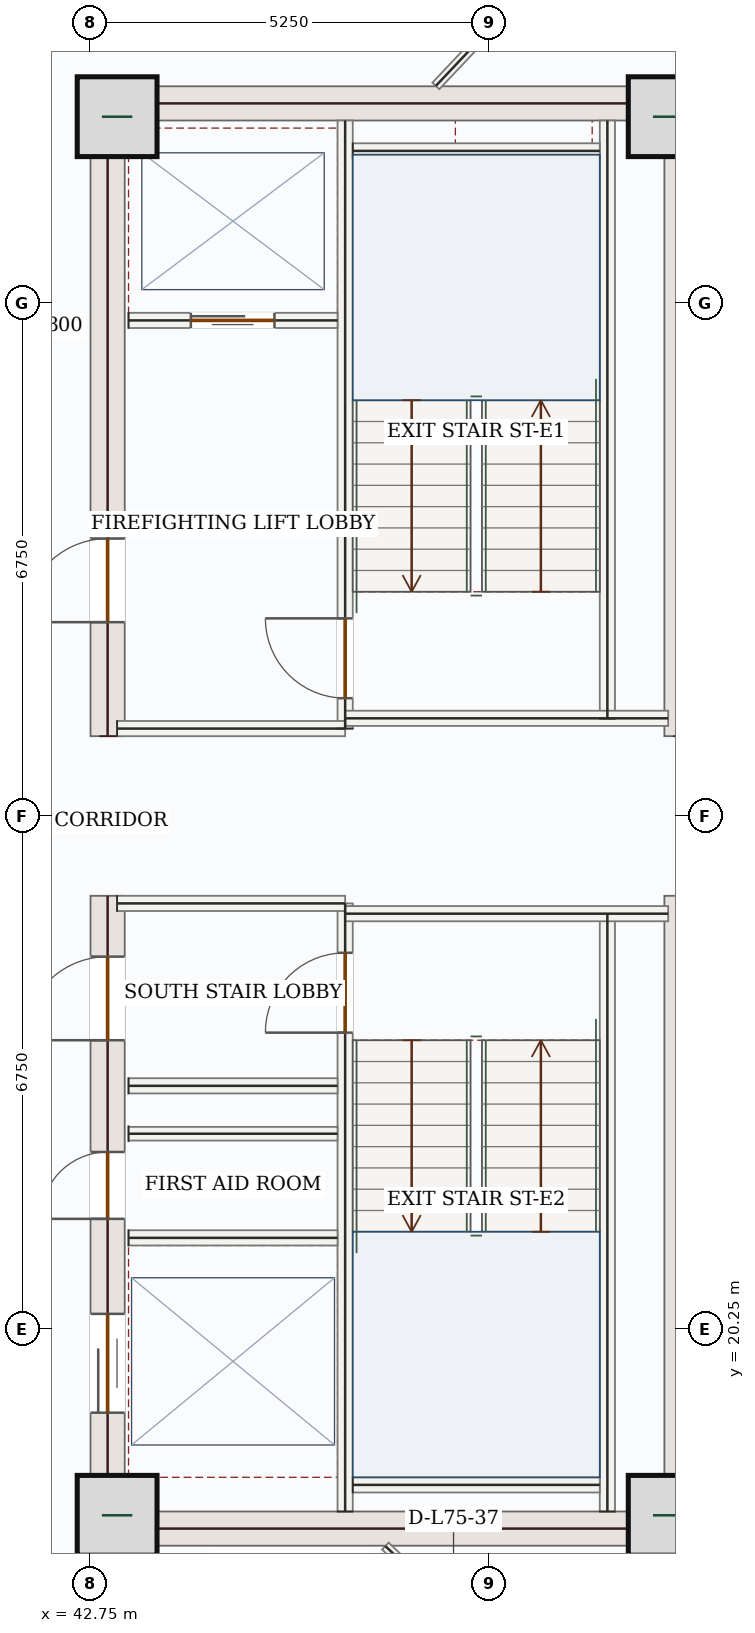
"""IFC4 building model, lengths in metres.
Left out: names, types, materials, properties, quantities, classifications, styles, units other than length and angle.
Written with IfcOpenShell. Run it as: python <this file> out.ifc"""

import sys

from ifc_helpers import new_model, si_unit, direction, frame, frame_2d, origin, origin_2d, place, context, subcontext, project, spatial, rectangle, extrude, source, transform, mapped, element, fill, save


model = new_model("IFC4")
c1 = context("Model", 3, precision=1e-05, world=origin(), true_north=direction((0.0, 1.0)))
c2 = subcontext(c1, "Body", "Model", "MODEL_VIEW")
j1 = project(units=[si_unit("LENGTHUNIT", "METRE"), si_unit("PLANEANGLEUNIT", "RADIAN")], contexts=[c1])
p1 = place(None, origin())
s1 = spatial("IfcSite", under=j1, at=p1, CompositionType="ELEMENT")
p2 = place(p1, origin())
s2 = spatial("IfcBuilding", under=s1, at=p2, CompositionType="ELEMENT")
p3 = place(p2, frame((0.0, 0.0, 310.35)))
s3 = spatial("IfcBuildingStorey", under=s2, at=p3, CompositionType="ELEMENT", Elevation=310.35)
p4 = place(p3, frame((42.975, 17.4, 0.0), z_axis=(0.0, 0.0, 1.0), x_axis=(0.0, 1.0, 0.0)))
e1 = element("IfcWall", 1, at=p4, inside=s3, PredefinedType="SHEAR", context=c2, shape_type="SweptSolid", body=[
    extrude(rectangle(XDim=8.55, YDim=0.45, at=frame_2d((4.275, 0.0))), origin(), (0.0, 0.0, 1.0), 3.3),
])
p5 = place(p4, frame((6.65, 0.0, 0.0)))
e2 = element("IfcOpeningElement", 2, at=p5, cuts=e1, PredefinedType="OPENING", context=c2, shape_type="SweptSolid", body=[
    extrude(rectangle(XDim=1.1, YDim=2.2, at=frame_2d((0.55, 1.1))), frame((0.0, 0.235, 0.0), z_axis=(0.0, -1.0, 0.0), x_axis=(1.0, 0.0, 0.0)), (0.0, 0.0, 1.0), 0.47),
])
p6 = place(p4, frame((1.75, 0.0, 0.0)))
e3 = element("IfcOpeningElement", 3, at=p6, cuts=e1, PredefinedType="OPENING", context=c2, shape_type="SweptSolid", body=[
    extrude(rectangle(XDim=1.3, YDim=2.2, at=frame_2d((0.65, 1.1))), frame((0.0, 0.235, 0.0), z_axis=(0.0, -1.0, 0.0), x_axis=(1.0, 0.0, 0.0)), (0.0, 0.0, 1.0), 0.47),
])
p7 = place(p4, frame((4.3, 0.0, 0.0)))
e4 = element("IfcOpeningElement", 4, at=p7, cuts=e1, PredefinedType="OPENING", context=c2, shape_type="SweptSolid", body=[
    extrude(rectangle(XDim=0.88, YDim=2.1, at=frame_2d((0.44, 1.05))), frame((0.0, 0.235, 0.0), z_axis=(0.0, -1.0, 0.0), x_axis=(1.0, 0.0, 0.0)), (0.0, 0.0, 1.0), 0.47),
])
p8 = place(p3, frame((42.975, 28.05, 0.0), z_axis=(0.0, 0.0, 1.0), x_axis=(0.0, 1.0, 0.0)))
e5 = element("IfcWall", 5, at=p8, inside=s3, PredefinedType="SHEAR", context=c2, shape_type="SweptSolid", body=[
    extrude(rectangle(XDim=8.55, YDim=0.45, at=frame_2d((4.275, 0.0))), origin(), (0.0, 0.0, 1.0), 3.3),
])
p9 = place(p8, frame((1.5, 0.0, 0.0)))
e6 = element("IfcOpeningElement", 6, at=p9, cuts=e5, PredefinedType="OPENING", context=c2, shape_type="SweptSolid", body=[
    extrude(rectangle(XDim=1.1, YDim=2.2, at=frame_2d((0.55, 1.1))), frame((0.0, 0.235, 0.0), z_axis=(0.0, -1.0, 0.0), x_axis=(1.0, 0.0, 0.0)), (0.0, 0.0, 1.0), 0.47),
])
m1 = source(origin(), c2, "Body", "SweptSolid", [
    extrude(rectangle(XDim=8.55, YDim=0.45, at=frame_2d((4.275, 0.0))), origin(), (0.0, 0.0, 1.0), 3.3),
])
for number, where, z_axis, x_axis in (
    (7, (50.525, 17.4, 0.0), (0.0, 0.0, 1.0), (0.0, 1.0, 0.0)),
    (8, (50.525, 28.05, 0.0), (0.0, 0.0, 1.0), (0.0, 1.0, 0.0)),
):
    element("IfcWall", number, at=place(p3, frame(where, z_axis=z_axis, x_axis=x_axis)), inside=s3, PredefinedType="SHEAR", context=c2, shape_type="MappedRepresentation", body=[
        mapped(m1, transform((0.0, 0.0, 0.0), x_axis=(1.0, 0.0, 0.0), y_axis=(0.0, 1.0, 0.0), z_axis=(0.0, 0.0, 1.0), scale=1.0)),
    ])
m2 = source(origin(), c2, "Body", "SweptSolid", [
    extrude(rectangle(XDim=7.1, YDim=0.45, at=frame_2d((3.55, 0.0))), origin(), (0.0, 0.0, 1.0), 3.3),
])
for number, where, z_axis, x_axis in (
    (9, (43.2, 17.625, 0.0), (0.0, 0.0, 1.0), (1.0, 0.0, 0.0)),
    (10, (43.2, 36.375, 0.0), (0.0, 0.0, 1.0), (1.0, 0.0, 0.0)),
):
    element("IfcWall", number, at=place(p3, frame(where, z_axis=z_axis, x_axis=x_axis)), inside=s3, PredefinedType="SHEAR", context=c2, shape_type="MappedRepresentation", body=[
        mapped(m2, transform((0.0, 0.0, 0.0), x_axis=(1.0, 0.0, 0.0), y_axis=(0.0, 1.0, 0.0), z_axis=(0.0, 0.0, 1.0), scale=1.0)),
    ])
m3 = source(origin(), c2, "Body", "SweptSolid", [
    extrude(rectangle(XDim=1.05, YDim=1.05, at=origin_2d()), origin(), (0.0, 0.0, 1.0), 3.75),
])
for number, where, z_axis, x_axis in (
    (11, (43.1, 17.8, 0.0), (0.0, 0.0, 1.0), (1.0, 0.0, 0.0)),
    (12, (50.35, 17.8, 0.0), (0.0, 0.0, 1.0), (1.0, 0.0, 0.0)),
    (13, (43.1, 36.2, 0.0), (0.0, 0.0, 1.0), (1.0, 0.0, 0.0)),
    (14, (50.35, 36.2, 0.0), (0.0, 0.0, 1.0), (1.0, 0.0, 0.0)),
):
    element("IfcColumn", number, at=place(p3, frame(where, z_axis=z_axis, x_axis=x_axis)), inside=s3, PredefinedType="COLUMN", context=c2, shape_type="MappedRepresentation", body=[
        mapped(m3, transform((0.0, 0.0, 0.0), x_axis=(1.0, 0.0, 0.0), y_axis=(0.0, 1.0, 0.0), z_axis=(0.0, 0.0, 1.0), scale=1.0)),
    ])
m4 = source(origin(), c2, "Body", "SweptSolid", [
    extrude(rectangle(XDim=9.92, YDim=0.28, at=frame_2d((4.96, 0.0))), origin(), (0.0, 0.0, 1.0), 3.3),
])
p10 = place(p3, frame((44.91, 43.649, 0.0), z_axis=(0.0, 0.0, 1.0), x_axis=(0.726772856404, -0.686877875022, 0.0)))
e15 = element("IfcWall", 15, at=p10, inside=s3, PredefinedType="SOLIDWALL", context=c2, shape_type="MappedRepresentation", body=[
    mapped(m4, transform((0.0, 0.0, 0.0), x_axis=(1.0, 0.0, 0.0), y_axis=(0.0, 1.0, 0.0), z_axis=(0.0, 0.0, 1.0), scale=1.0)),
])
m5 = source(origin(), c2, "Body", "SweptSolid", [
    extrude(rectangle(XDim=10.47, YDim=0.28, at=frame_2d((5.235, 0.0))), origin(), (0.0, 0.0, 1.0), 3.3),
])
p11 = place(p3, frame((53.06, 18.458, 0.0), z_axis=(0.0, 0.0, 1.0), x_axis=(-0.690070788875, -0.723741878256, 0.0)))
e16 = element("IfcWall", 16, at=p11, inside=s3, PredefinedType="SOLIDWALL", context=c2, shape_type="MappedRepresentation", body=[
    mapped(m5, transform((0.0, 0.0, 0.0), x_axis=(1.0, 0.0, 0.0), y_axis=(0.0, 1.0, 0.0), z_axis=(0.0, 0.0, 1.0), scale=1.0)),
])
m6 = source(origin(), c2, "Body", "SweptSolid", [
    extrude(rectangle(XDim=7.87, YDim=0.2, at=frame_2d((3.935, 0.0))), origin(), (0.0, 0.0, 1.0), 3.3),
])
for number, where, z_axis, x_axis in (
    (17, (49.55, 17.85, 0.0), (0.0, 0.0, 1.0), (0.0, 1.0, 0.0)),
    (18, (49.55, 28.28, 0.0), (0.0, 0.0, 1.0), (0.0, 1.0, 0.0)),
):
    element("IfcWall", number, at=place(p3, frame(where, z_axis=z_axis, x_axis=x_axis)), inside=s3, PredefinedType="SOLIDWALL", context=c2, shape_type="MappedRepresentation", body=[
        mapped(m6, transform((0.0, 0.0, 0.0), x_axis=(1.0, 0.0, 0.0), y_axis=(0.0, 1.0, 0.0), z_axis=(0.0, 0.0, 1.0), scale=1.0)),
    ])
p12 = place(p3, frame((46.1, 17.85, 0.0), z_axis=(0.0, 0.0, 1.0), x_axis=(0.0, 1.0, 0.0)))
e19 = element("IfcWall", 19, at=p12, inside=s3, PredefinedType="SOLIDWALL", context=c2, shape_type="SweptSolid", body=[
    extrude(rectangle(XDim=8.0, YDim=0.2, at=frame_2d((4.0, 0.0))), origin(), (0.0, 0.0, 1.0), 3.3),
])
p13 = place(p12, frame((6.3, 0.0, 0.0)))
e20 = element("IfcOpeningElement", 20, at=p13, cuts=e19, PredefinedType="OPENING", context=c2, shape_type="SweptSolid", body=[
    extrude(rectangle(XDim=1.05, YDim=2.15, at=frame_2d((0.525, 1.075))), frame((0.0, 0.11, 0.0), z_axis=(0.0, -1.0, 0.0), x_axis=(1.0, 0.0, 0.0)), (0.0, 0.0, 1.0), 0.22),
])
p14 = place(p3, frame((46.1, 28.15, 0.0), z_axis=(0.0, 0.0, 1.0), x_axis=(0.0, 1.0, 0.0)))
e21 = element("IfcWall", 21, at=p14, inside=s3, PredefinedType="SOLIDWALL", context=c2, shape_type="SweptSolid", body=[
    extrude(rectangle(XDim=8.0, YDim=0.2, at=frame_2d((4.0, 0.0))), origin(), (0.0, 0.0, 1.0), 3.3),
])
p15 = place(p14, frame((0.4, 0.0, 0.0)))
e22 = element("IfcOpeningElement", 22, at=p15, cuts=e21, PredefinedType="OPENING", context=c2, shape_type="SweptSolid", body=[
    extrude(rectangle(XDim=1.05, YDim=2.15, at=frame_2d((0.525, 1.075))), frame((0.0, 0.11, 0.0), z_axis=(0.0, -1.0, 0.0), x_axis=(1.0, 0.0, 0.0)), (0.0, 0.0, 1.0), 0.22),
])
m7 = source(origin(), c2, "Body", "SweptSolid", [
    extrude(rectangle(XDim=3.0, YDim=0.2, at=frame_2d((1.5, 0.0))), origin(), (0.0, 0.0, 1.0), 3.3),
])
p16 = place(p3, frame((43.1, 25.85, 0.0), z_axis=(0.0, 0.0, 1.0), x_axis=(1.0, 0.0, 0.0)))
e23 = element("IfcWall", 23, at=p16, inside=s3, PredefinedType="SOLIDWALL", context=c2, shape_type="MappedRepresentation", body=[
    mapped(m7, transform((0.0, 0.0, 0.0), x_axis=(1.0, 0.0, 0.0), y_axis=(0.0, 1.0, 0.0), z_axis=(0.0, 0.0, 1.0), scale=1.0)),
])
m8 = source(origin(), c2, "Body", "SweptSolid", [
    extrude(rectangle(XDim=4.25, YDim=0.2, at=frame_2d((2.125, 0.0))), origin(), (0.0, 0.0, 1.0), 3.3),
])
p17 = place(p3, frame((46.1, 25.715, 0.0), z_axis=(0.0, 0.0, 1.0), x_axis=(1.0, 0.0, 0.0)))
e24 = element("IfcWall", 24, at=p17, inside=s3, PredefinedType="SOLIDWALL", context=c2, shape_type="MappedRepresentation", body=[
    mapped(m8, transform((0.0, 0.0, 0.0), x_axis=(1.0, 0.0, 0.0), y_axis=(0.0, 1.0, 0.0), z_axis=(0.0, 0.0, 1.0), scale=1.0)),
])
p18 = place(p3, frame((43.1, 28.15, 0.0), z_axis=(0.0, 0.0, 1.0), x_axis=(1.0, 0.0, 0.0)))
e25 = element("IfcWall", 25, at=p18, inside=s3, PredefinedType="SOLIDWALL", context=c2, shape_type="MappedRepresentation", body=[
    mapped(m7, transform((0.0, 0.0, 0.0), x_axis=(1.0, 0.0, 0.0), y_axis=(0.0, 1.0, 0.0), z_axis=(0.0, 0.0, 1.0), scale=1.0)),
])
p19 = place(p3, frame((46.1, 28.285, 0.0), z_axis=(0.0, 0.0, 1.0), x_axis=(1.0, 0.0, 0.0)))
e26 = element("IfcWall", 26, at=p19, inside=s3, PredefinedType="SOLIDWALL", context=c2, shape_type="MappedRepresentation", body=[
    mapped(m8, transform((0.0, 0.0, 0.0), x_axis=(1.0, 0.0, 0.0), y_axis=(0.0, 1.0, 0.0), z_axis=(0.0, 0.0, 1.0), scale=1.0)),
])
m9 = source(origin(), c2, "Body", "SweptSolid", [
    extrude(rectangle(XDim=3.25, YDim=0.2, at=frame_2d((1.625, 0.0))), origin(), (0.0, 0.0, 1.0), 3.3),
])
for number, where, z_axis, x_axis in (
    (27, (46.2, 35.75, 0.0), (0.0, 0.0, 1.0), (1.0, 0.0, 0.0)),
    (28, (46.2, 18.2, 0.0), (0.0, 0.0, 1.0), (1.0, 0.0, 0.0)),
):
    element("IfcWall", number, at=place(p3, frame(where, z_axis=z_axis, x_axis=x_axis)), inside=s3, PredefinedType="SOLIDWALL", context=c2, shape_type="MappedRepresentation", body=[
        mapped(m9, transform((0.0, 0.0, 0.0), x_axis=(1.0, 0.0, 0.0), y_axis=(0.0, 1.0, 0.0), z_axis=(0.0, 0.0, 1.0), scale=1.0)),
    ])
p20 = place(p3, frame((43.25, 33.52, 0.0), z_axis=(0.0, 0.0, 1.0), x_axis=(1.0, 0.0, 0.0)))
e29 = element("IfcWall", 29, at=p20, inside=s3, PredefinedType="SOLIDWALL", context=c2, shape_type="SweptSolid", body=[
    extrude(rectangle(XDim=2.75, YDim=0.2, at=frame_2d((1.375, 0.0))), origin(), (0.0, 0.0, 1.0), 3.3),
])
p21 = place(p20, frame((0.82, 0.0, 0.0)))
e30 = element("IfcOpeningElement", 30, at=p21, cuts=e29, PredefinedType="OPENING", context=c2, shape_type="SweptSolid", body=[
    extrude(rectangle(XDim=1.1, YDim=2.15, at=frame_2d((0.55, 1.075))), frame((0.0, 0.11, 0.0), z_axis=(0.0, -1.0, 0.0), x_axis=(1.0, 0.0, 0.0)), (0.0, 0.0, 1.0), 0.22),
])
m10 = source(origin(), c2, "Body", "SweptSolid", [
    extrude(rectangle(XDim=2.75, YDim=0.2, at=frame_2d((1.375, 0.0))), origin(), (0.0, 0.0, 1.0), 3.3),
])
for number, where, z_axis, x_axis in (
    (31, (43.25, 23.45, 0.0), (0.0, 0.0, 1.0), (1.0, 0.0, 0.0)),
    (32, (43.25, 21.45, 0.0), (0.0, 0.0, 1.0), (1.0, 0.0, 0.0)),
):
    element("IfcWall", number, at=place(p3, frame(where, z_axis=z_axis, x_axis=x_axis)), inside=s3, PredefinedType="SOLIDWALL", context=c2, shape_type="MappedRepresentation", body=[
        mapped(m10, transform((0.0, 0.0, 0.0), x_axis=(1.0, 0.0, 0.0), y_axis=(0.0, 1.0, 0.0), z_axis=(0.0, 0.0, 1.0), scale=1.0)),
    ])
m11 = source(origin(), c2, "Body", "SweptSolid", [
    extrude(rectangle(XDim=2.75, YDim=0.18, at=frame_2d((1.375, 0.0))), origin(), (0.0, 0.0, 1.0), 3.3),
])
p22 = place(p3, frame((43.25, 22.82, 0.0), z_axis=(0.0, 0.0, 1.0), x_axis=(1.0, 0.0, 0.0)))
e33 = element("IfcWall", 33, at=p22, inside=s3, PredefinedType="PARTITIONING", context=c2, shape_type="MappedRepresentation", body=[
    mapped(m11, transform((0.0, 0.0, 0.0), x_axis=(1.0, 0.0, 0.0), y_axis=(0.0, 1.0, 0.0), z_axis=(0.0, 0.0, 1.0), scale=1.0)),
])
p23 = place(p3, frame((48.349, 15.769, 0.0), z_axis=(0.0, 0.0, 1.0), x_axis=(-0.726735597886, 0.686917295433, 0.0)))
e34 = element("IfcWall", 34, at=p23, inside=s3, PredefinedType="PARTITIONING", context=c2, shape_type="SweptSolid", body=[
    extrude(rectangle(XDim=2.367, YDim=0.125, at=frame_2d((1.183, 0.0))), origin(), (0.0, 0.0, 1.0), 3.3),
])
p24 = place(p23, frame((0.692, 0.0, 0.0)))
e35 = element("IfcOpeningElement", 35, at=p24, cuts=e34, PredefinedType="OPENING", context=c2, shape_type="SweptSolid", body=[
    extrude(rectangle(XDim=0.88, YDim=2.1, at=frame_2d((0.44, 1.05))), frame((0.0, 0.073, 0.0), z_axis=(0.0, -1.0, 0.0), x_axis=(1.0, 0.0, 0.0)), (0.0, 0.0, 1.0), 0.145),
])
m12 = source(origin(), c2, "Body", "SweptSolid", [
    extrude(rectangle(XDim=3.337, YDim=0.125, at=frame_2d((1.669, 0.0))), origin(), (0.0, 0.0, 1.0), 3.3),
])
p25 = place(p3, frame((49.585, 39.031, 0.0), z_axis=(0.0, 0.0, 1.0), x_axis=(-0.686891986515, -0.726759519278, 0.0)))
e36 = element("IfcWall", 36, at=p25, inside=s3, PredefinedType="PARTITIONING", context=c2, shape_type="MappedRepresentation", body=[
    mapped(m12, transform((0.0, 0.0, 0.0), x_axis=(1.0, 0.0, 0.0), y_axis=(0.0, 1.0, 0.0), z_axis=(0.0, 0.0, 1.0), scale=1.0)),
])
m13 = source(origin(), c2, "Body", "SweptSolid", [
    extrude(rectangle(XDim=1.05, YDim=2.15, at=frame_2d((0.525, 1.075))), frame((0.0, 0.025, 0.0), z_axis=(0.0, -1.0, 0.0), x_axis=(1.0, 0.0, 0.0)), (0.0, 0.0, 1.0), 0.05),
])
p26 = place(p15, origin())
e37 = element("IfcDoor", 37, at=p26, inside=s3, OperationType="SINGLE_SWING_RIGHT", PredefinedType="DOOR", context=c2, shape_type="MappedRepresentation", body=[
    mapped(m13, transform((0.0, 0.0, 0.0), x_axis=(1.0, 0.0, 0.0), y_axis=(0.0, 1.0, 0.0), z_axis=(0.0, 0.0, 1.0), scale=1.0)),
])
fill(e22, e37)
p27 = place(p13, origin())
e38 = element("IfcDoor", 38, at=p27, inside=s3, OperationType="SINGLE_SWING_LEFT", PredefinedType="DOOR", context=c2, shape_type="MappedRepresentation", body=[
    mapped(m13, transform((0.0, 0.0, 0.0), x_axis=(1.0, 0.0, 0.0), y_axis=(0.0, 1.0, 0.0), z_axis=(0.0, 0.0, 1.0), scale=1.0)),
])
fill(e20, e38)
m14 = source(origin(), c2, "Body", "SweptSolid", [
    extrude(rectangle(XDim=1.1, YDim=2.15, at=frame_2d((0.55, 1.075))), frame((0.0, 0.025, 0.0), z_axis=(0.0, -1.0, 0.0), x_axis=(1.0, 0.0, 0.0)), (0.0, 0.0, 1.0), 0.05),
])
p28 = place(p21, origin())
e39 = element("IfcDoor", 39, at=p28, inside=s3, OperationType="DOUBLE_DOOR_SLIDING", PredefinedType="DOOR", context=c2, shape_type="MappedRepresentation", body=[
    mapped(m14, transform((0.0, 0.0, 0.0), x_axis=(1.0, 0.0, 0.0), y_axis=(0.0, 1.0, 0.0), z_axis=(0.0, 0.0, 1.0), scale=1.0)),
])
fill(e30, e39)
m15 = source(origin(), c2, "Body", "SweptSolid", [
    extrude(rectangle(XDim=1.1, YDim=2.2, at=frame_2d((0.55, 1.1))), frame((0.0, 0.025, 0.0), z_axis=(0.0, -1.0, 0.0), x_axis=(1.0, 0.0, 0.0)), (0.0, 0.0, 1.0), 0.05),
])
p29 = place(p9, origin())
e40 = element("IfcDoor", 40, at=p29, inside=s3, OperationType="SINGLE_SWING_LEFT", PredefinedType="DOOR", context=c2, shape_type="MappedRepresentation", body=[
    mapped(m15, transform((0.0, 0.0, 0.0), x_axis=(1.0, 0.0, 0.0), y_axis=(0.0, 1.0, 0.0), z_axis=(0.0, 0.0, 1.0), scale=1.0)),
])
fill(e6, e40)
p30 = place(p5, origin())
e41 = element("IfcDoor", 41, at=p30, inside=s3, OperationType="SINGLE_SWING_LEFT", PredefinedType="DOOR", context=c2, shape_type="MappedRepresentation", body=[
    mapped(m15, transform((0.0, 0.0, 0.0), x_axis=(1.0, 0.0, 0.0), y_axis=(0.0, 1.0, 0.0), z_axis=(0.0, 0.0, 1.0), scale=1.0)),
])
fill(e2, e41)
m16 = source(origin(), c2, "Body", "SweptSolid", [
    extrude(rectangle(XDim=1.3, YDim=2.2, at=frame_2d((0.65, 1.1))), frame((0.0, 0.025, 0.0), z_axis=(0.0, -1.0, 0.0), x_axis=(1.0, 0.0, 0.0)), (0.0, 0.0, 1.0), 0.05),
])
p31 = place(p6, origin())
e42 = element("IfcDoor", 42, at=p31, inside=s3, OperationType="DOUBLE_DOOR_SLIDING", PredefinedType="DOOR", context=c2, shape_type="MappedRepresentation", body=[
    mapped(m16, transform((0.0, 0.0, 0.0), x_axis=(1.0, 0.0, 0.0), y_axis=(0.0, 1.0, 0.0), z_axis=(0.0, 0.0, 1.0), scale=1.0)),
])
fill(e3, e42)
m17 = source(origin(), c2, "Body", "SweptSolid", [
    extrude(rectangle(XDim=0.88, YDim=2.1, at=frame_2d((0.44, 1.05))), frame((0.0, 0.025, 0.0), z_axis=(0.0, -1.0, 0.0), x_axis=(1.0, 0.0, 0.0)), (0.0, 0.0, 1.0), 0.05),
])
p32 = place(p7, origin())
e43 = element("IfcDoor", 43, at=p32, inside=s3, OperationType="SINGLE_SWING_LEFT", PredefinedType="DOOR", context=c2, shape_type="MappedRepresentation", body=[
    mapped(m17, transform((0.0, 0.0, 0.0), x_axis=(1.0, 0.0, 0.0), y_axis=(0.0, 1.0, 0.0), z_axis=(0.0, 0.0, 1.0), scale=1.0)),
])
fill(e4, e43)
save(model, sys.argv[1])
